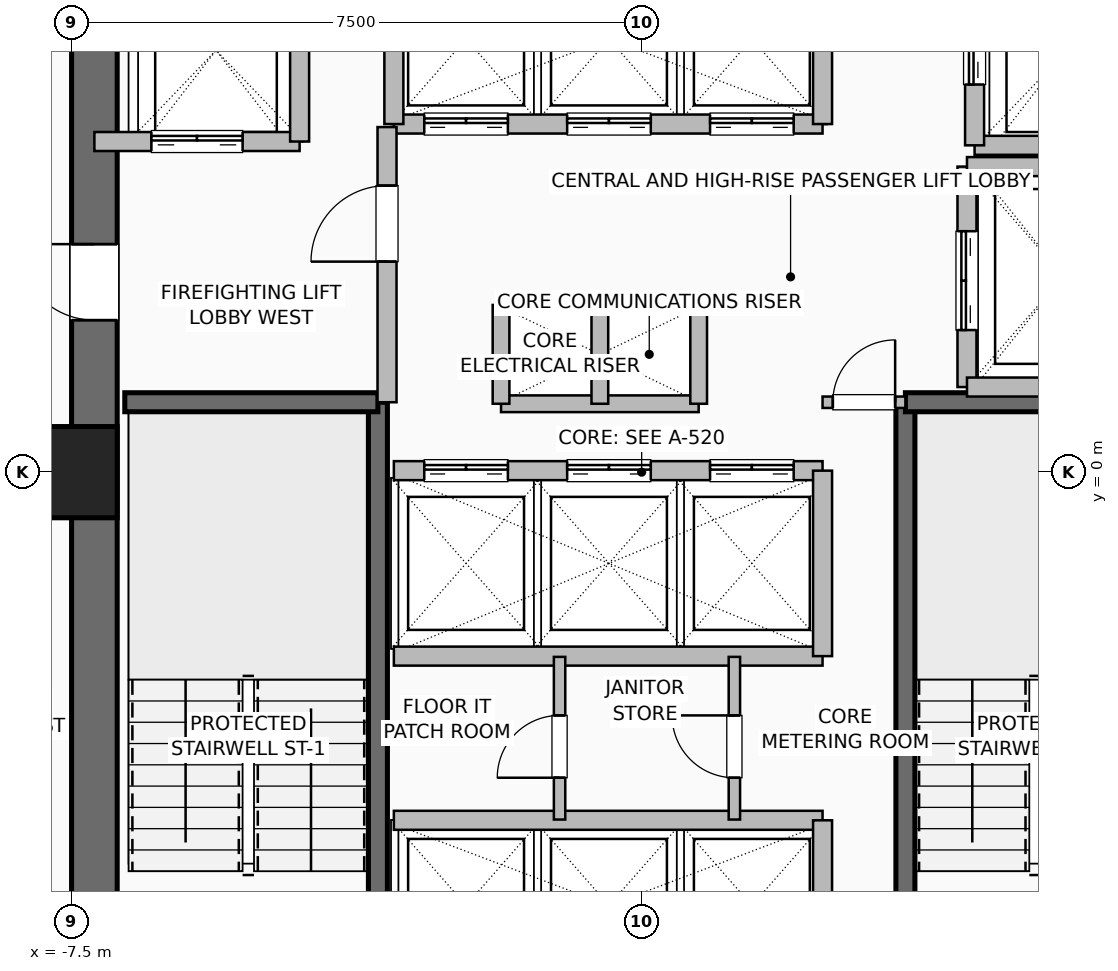
"""IFC4 building model, lengths in metres.
Left out: names, types, materials, properties, quantities, classifications, styles, units other than length and angle.
Written with IfcOpenShell. Run it as: python <this file> out.ifc"""

import sys

from ifc_helpers import new_model, si_unit, direction, frame, frame_2d, origin, origin_2d, place, context, subcontext, project, spatial, rectangle, hollow_rectangle, extrude, element, fill, save


model = new_model("IFC4")
c1 = context("Model", 3, precision=1e-05, world=origin(), true_north=direction((0.0, 1.0)))
c2 = subcontext(c1, "Body", "Model", "MODEL_VIEW")
j1 = project(units=[si_unit("LENGTHUNIT", "METRE"), si_unit("PLANEANGLEUNIT", "RADIAN")], contexts=[c1])
p1 = place(None, origin())
s1 = spatial("IfcSite", under=j1, at=p1, CompositionType="ELEMENT")
p2 = place(p1, origin())
s2 = spatial("IfcBuilding", under=s1, at=p2, CompositionType="ELEMENT")
p3 = place(p2, frame((0.0, 0.0, 76.0)))
s3 = spatial("IfcBuildingStorey", under=s2, at=p3, CompositionType="ELEMENT", Elevation=76.0)
p4 = place(p3, frame((-7.5, 0.0, 0.0), z_axis=(0.0, 0.0, 1.0), x_axis=(1.0, 0.0, 0.0)))
e1 = element("IfcColumn", 1, at=p4, inside=s3, PredefinedType="COLUMN", context=c2, shape_type="SweptSolid", body=[
    extrude(hollow_rectangle(XDim=1.2, YDim=1.2, WallThickness=0.055, at=origin_2d()), origin(), (0.0, 0.0, 1.0), 3.5),
])
p5 = place(p3, frame((-7.2, -7.5, 0.0), z_axis=(0.0, 0.0, 1.0), x_axis=(0.0, 1.0, 0.0)))
e2 = element("IfcWall", 2, at=p5, inside=s3, PredefinedType="SHEAR", context=c2, shape_type="SweptSolid", body=[
    extrude(rectangle(XDim=15.0, YDim=0.6, at=frame_2d((7.5, 0.0))), origin(), (0.0, 0.0, 1.0), 3.25),
])
p6 = place(p5, frame((9.5, 0.0, 0.0)))
e3 = element("IfcOpeningElement", 3, at=p6, cuts=e2, PredefinedType="OPENING", context=c2, shape_type="SweptSolid", body=[
    extrude(rectangle(XDim=1.0, YDim=2.08, at=frame_2d((0.5, 1.04))), frame((0.0, 0.31, 0.0), z_axis=(0.0, -1.0, 0.0), x_axis=(1.0, 0.0, 0.0)), (0.0, 0.0, 1.0), 0.62),
])
p7 = place(p3, frame((-3.47, -6.8, 0.0), z_axis=(0.0, 0.0, 1.0), x_axis=(0.0, 1.0, 0.0)))
e4 = element("IfcWall", 4, at=p7, inside=s3, PredefinedType="SHEAR", context=c2, shape_type="SweptSolid", body=[
    extrude(rectangle(XDim=7.72, YDim=0.25, at=frame_2d((3.86, 0.0))), origin(), (0.0, 0.0, 1.0), 3.25),
])
p8 = place(p3, frame((-6.8, 0.92, 0.0), z_axis=(0.0, 0.0, 1.0), x_axis=(1.0, 0.0, 0.0)))
e5 = element("IfcWall", 5, at=p8, inside=s3, PredefinedType="SHEAR", context=c2, shape_type="SweptSolid", body=[
    extrude(rectangle(XDim=3.33, YDim=0.25, at=frame_2d((1.665, 0.0))), origin(), (0.0, 0.0, 1.0), 3.25),
])
p9 = place(p3, frame((3.47, -6.8, 0.0), z_axis=(0.0, 0.0, 1.0), x_axis=(0.0, 1.0, 0.0)))
e6 = element("IfcWall", 6, at=p9, inside=s3, PredefinedType="SHEAR", context=c2, shape_type="SweptSolid", body=[
    extrude(rectangle(XDim=7.72, YDim=0.25, at=frame_2d((3.86, 0.0))), origin(), (0.0, 0.0, 1.0), 3.25),
])
p10 = place(p3, frame((3.47, 0.92, 0.0), z_axis=(0.0, 0.0, 1.0), x_axis=(1.0, 0.0, 0.0)))
e7 = element("IfcWall", 7, at=p10, inside=s3, PredefinedType="SHEAR", context=c2, shape_type="SweptSolid", body=[
    extrude(rectangle(XDim=3.33, YDim=0.25, at=frame_2d((1.665, 0.0))), origin(), (0.0, 0.0, 1.0), 3.25),
])
for number, where, z_axis, x_axis in (
    (8, (-1.85, 2.2, 0.0), (0.0, 0.0, 1.0), (1.0, 0.0, 0.0)),
    (9, (-1.85, 0.9, 0.0), (0.0, 0.0, 1.0), (1.0, 0.0, 0.0)),
):
    element("IfcWall", number, at=place(p3, frame(where, z_axis=z_axis, x_axis=x_axis)), inside=s3, PredefinedType="PARTITIONING", context=c2, shape_type="SweptSolid", body=[
        extrude(rectangle(XDim=2.6, YDim=0.22, at=frame_2d((1.3, 0.0))), origin(), (0.0, 0.0, 1.0), 3.25),
    ])
for number, where, z_axis, x_axis in (
    (10, (-0.55, 0.9, 0.0), (0.0, 0.0, 1.0), (0.0, 1.0, 0.0)),
    (11, (0.75, 0.9, 0.0), (0.0, 0.0, 1.0), (0.0, 1.0, 0.0)),
    (12, (-1.85, 0.9, 0.0), (0.0, 0.0, 1.0), (0.0, 1.0, 0.0)),
):
    element("IfcWall", number, at=place(p3, frame(where, z_axis=z_axis, x_axis=x_axis)), inside=s3, PredefinedType="PARTITIONING", context=c2, shape_type="SweptSolid", body=[
        extrude(rectangle(XDim=1.3, YDim=0.22, at=frame_2d((0.65, 0.0))), origin(), (0.0, 0.0, 1.0), 3.25),
    ])
p11 = place(p3, frame((-3.26, -4.58, 0.0), z_axis=(0.0, 0.0, 1.0), x_axis=(1.0, 0.0, 0.0)))
e13 = element("IfcWall", 13, at=p11, inside=s3, PredefinedType="SHEAR", context=c2, shape_type="SweptSolid", body=[
    extrude(rectangle(XDim=5.64, YDim=0.25, at=frame_2d((2.82, 0.0))), origin(), (0.0, 0.0, 1.0), 3.25),
])
p12 = place(p3, frame((2.38, -6.8, 0.0), z_axis=(0.0, 0.0, 1.0), x_axis=(0.0, 1.0, 0.0)))
e14 = element("IfcWall", 14, at=p12, inside=s3, PredefinedType="SHEAR", context=c2, shape_type="SweptSolid", body=[
    extrude(rectangle(XDim=2.22, YDim=0.25, at=frame_2d((1.11, 0.0))), origin(), (0.0, 0.0, 1.0), 3.25),
])
p13 = place(p3, frame((-3.26, 0.02, 0.0), z_axis=(0.0, 0.0, 1.0), x_axis=(1.0, 0.0, 0.0)))
e15 = element("IfcWall", 15, at=p13, inside=s3, PredefinedType="SHEAR", context=c2, shape_type="SweptSolid", body=[
    extrude(rectangle(XDim=5.64, YDim=0.25, at=frame_2d((2.82, 0.0))), origin(), (0.0, 0.0, 1.0), 3.25),
])
p14 = place(p13, frame((0.4, 0.0, 0.0)))
e16 = element("IfcOpeningElement", 16, at=p14, cuts=e15, PredefinedType="OPENING", context=c2, shape_type="SweptSolid", body=[
    extrude(rectangle(XDim=1.1, YDim=2.2, at=frame_2d((0.55, 1.1))), frame((0.0, 0.135, 0.0), z_axis=(0.0, -1.0, 0.0), x_axis=(1.0, 0.0, 0.0)), (0.0, 0.0, 1.0), 0.27),
])
p15 = place(p13, frame((2.28, 0.0, 0.0)))
e17 = element("IfcOpeningElement", 17, at=p15, cuts=e15, PredefinedType="OPENING", context=c2, shape_type="SweptSolid", body=[
    extrude(rectangle(XDim=1.1, YDim=2.2, at=frame_2d((0.55, 1.1))), frame((0.0, 0.135, 0.0), z_axis=(0.0, -1.0, 0.0), x_axis=(1.0, 0.0, 0.0)), (0.0, 0.0, 1.0), 0.27),
])
p16 = place(p13, frame((4.16, 0.0, 0.0)))
e18 = element("IfcOpeningElement", 18, at=p16, cuts=e15, PredefinedType="OPENING", context=c2, shape_type="SweptSolid", body=[
    extrude(rectangle(XDim=1.1, YDim=2.2, at=frame_2d((0.55, 1.1))), frame((0.0, 0.135, 0.0), z_axis=(0.0, -1.0, 0.0), x_axis=(1.0, 0.0, 0.0)), (0.0, 0.0, 1.0), 0.27),
])
p17 = place(p3, frame((-3.26, -2.42, 0.0), z_axis=(0.0, 0.0, 1.0), x_axis=(1.0, 0.0, 0.0)))
e19 = element("IfcWall", 19, at=p17, inside=s3, PredefinedType="SHEAR", context=c2, shape_type="SweptSolid", body=[
    extrude(rectangle(XDim=5.64, YDim=0.25, at=frame_2d((2.82, 0.0))), origin(), (0.0, 0.0, 1.0), 3.25),
])
p18 = place(p3, frame((2.38, -2.42, 0.0), z_axis=(0.0, 0.0, 1.0), x_axis=(0.0, 1.0, 0.0)))
e20 = element("IfcWall", 20, at=p18, inside=s3, PredefinedType="SHEAR", context=c2, shape_type="SweptSolid", body=[
    extrude(rectangle(XDim=2.44, YDim=0.25, at=frame_2d((1.22, 0.0))), origin(), (0.0, 0.0, 1.0), 3.25),
])
p19 = place(p3, frame((-3.26, 4.58, 0.0), z_axis=(0.0, 0.0, 1.0), x_axis=(1.0, 0.0, 0.0)))
e21 = element("IfcWall", 21, at=p19, inside=s3, PredefinedType="SHEAR", context=c2, shape_type="SweptSolid", body=[
    extrude(rectangle(XDim=5.64, YDim=0.25, at=frame_2d((2.82, 0.0))), origin(), (0.0, 0.0, 1.0), 3.25),
])
p20 = place(p19, frame((0.4, 0.0, 0.0)))
e22 = element("IfcOpeningElement", 22, at=p20, cuts=e21, PredefinedType="OPENING", context=c2, shape_type="SweptSolid", body=[
    extrude(rectangle(XDim=1.1, YDim=2.2, at=frame_2d((0.55, 1.1))), frame((0.0, 0.135, 0.0), z_axis=(0.0, -1.0, 0.0), x_axis=(1.0, 0.0, 0.0)), (0.0, 0.0, 1.0), 0.27),
])
p21 = place(p19, frame((2.28, 0.0, 0.0)))
e23 = element("IfcOpeningElement", 23, at=p21, cuts=e21, PredefinedType="OPENING", context=c2, shape_type="SweptSolid", body=[
    extrude(rectangle(XDim=1.1, YDim=2.2, at=frame_2d((0.55, 1.1))), frame((0.0, 0.135, 0.0), z_axis=(0.0, -1.0, 0.0), x_axis=(1.0, 0.0, 0.0)), (0.0, 0.0, 1.0), 0.27),
])
p22 = place(p19, frame((4.16, 0.0, 0.0)))
e24 = element("IfcOpeningElement", 24, at=p22, cuts=e21, PredefinedType="OPENING", context=c2, shape_type="SweptSolid", body=[
    extrude(rectangle(XDim=1.1, YDim=2.2, at=frame_2d((0.55, 1.1))), frame((0.0, 0.135, 0.0), z_axis=(0.0, -1.0, 0.0), x_axis=(1.0, 0.0, 0.0)), (0.0, 0.0, 1.0), 0.27),
])
for number, where, z_axis, x_axis in (
    (25, (-3.26, 4.58, 0.0), (0.0, 0.0, 1.0), (0.0, 1.0, 0.0)),
    (26, (2.38, 4.58, 0.0), (0.0, 0.0, 1.0), (0.0, 1.0, 0.0)),
):
    element("IfcWall", number, at=place(p3, frame(where, z_axis=z_axis, x_axis=x_axis)), inside=s3, PredefinedType="SHEAR", context=c2, shape_type="SweptSolid", body=[
        extrude(rectangle(XDim=2.22, YDim=0.25, at=frame_2d((1.11, 0.0))), origin(), (0.0, 0.0, 1.0), 3.25),
    ])
p23 = place(p3, frame((-7.2, 4.35, 0.0), z_axis=(0.0, 0.0, 1.0), x_axis=(1.0, 0.0, 0.0)))
e27 = element("IfcWall", 27, at=p23, inside=s3, PredefinedType="SHEAR", context=c2, shape_type="SweptSolid", body=[
    extrude(rectangle(XDim=2.7, YDim=0.25, at=frame_2d((1.35, 0.0))), origin(), (0.0, 0.0, 1.0), 3.25),
])
p24 = place(p23, frame((0.75, 0.0, 0.0)))
e28 = element("IfcOpeningElement", 28, at=p24, cuts=e27, PredefinedType="OPENING", context=c2, shape_type="SweptSolid", body=[
    extrude(rectangle(XDim=1.2, YDim=2.2, at=frame_2d((0.6, 1.1))), frame((0.0, 0.135, 0.0), z_axis=(0.0, -1.0, 0.0), x_axis=(1.0, 0.0, 0.0)), (0.0, 0.0, 1.0), 0.27),
])
p25 = place(p3, frame((-4.5, 4.35, 0.0), z_axis=(0.0, 0.0, 1.0), x_axis=(0.0, 1.0, 0.0)))
e29 = element("IfcWall", 29, at=p25, inside=s3, PredefinedType="SHEAR", context=c2, shape_type="SweptSolid", body=[
    extrude(rectangle(XDim=2.85, YDim=0.25, at=frame_2d((1.425, 0.0))), origin(), (0.0, 0.0, 1.0), 3.25),
])
p26 = place(p3, frame((4.38, 4.3, 0.0), z_axis=(0.0, 0.0, 1.0), x_axis=(1.0, 0.0, 0.0)))
e30 = element("IfcWall", 30, at=p26, inside=s3, PredefinedType="SHEAR", context=c2, shape_type="SweptSolid", body=[
    extrude(rectangle(XDim=2.42, YDim=0.25, at=frame_2d((1.21, 0.0))), origin(), (0.0, 0.0, 1.0), 3.25),
])
p27 = place(p3, frame((4.38, 4.3, 0.0), z_axis=(0.0, 0.0, 1.0), x_axis=(0.0, 1.0, 0.0)))
e31 = element("IfcWall", 31, at=p27, inside=s3, PredefinedType="SHEAR", context=c2, shape_type="SweptSolid", body=[
    extrude(rectangle(XDim=2.5, YDim=0.25, at=frame_2d((1.25, 0.0))), origin(), (0.0, 0.0, 1.0), 3.25),
])
p28 = place(p27, frame((0.8, 0.0, 0.0)))
e32 = element("IfcOpeningElement", 32, at=p28, cuts=e31, PredefinedType="OPENING", context=c2, shape_type="SweptSolid", body=[
    extrude(rectangle(XDim=1.2, YDim=2.2, at=frame_2d((0.6, 1.1))), frame((0.0, 0.135, 0.0), z_axis=(0.0, -1.0, 0.0), x_axis=(1.0, 0.0, 0.0)), (0.0, 0.0, 1.0), 0.27),
])
p29 = place(p3, frame((4.28, 1.12, 0.0), z_axis=(0.0, 0.0, 1.0), x_axis=(0.0, 1.0, 0.0)))
e33 = element("IfcWall", 33, at=p29, inside=s3, PredefinedType="SHEAR", context=c2, shape_type="SweptSolid", body=[
    extrude(rectangle(XDim=2.9, YDim=0.25, at=frame_2d((1.45, 0.0))), origin(), (0.0, 0.0, 1.0), 3.25),
])
p30 = place(p29, frame((0.75, 0.0, 0.0)))
e34 = element("IfcOpeningElement", 34, at=p30, cuts=e33, PredefinedType="OPENING", context=c2, shape_type="SweptSolid", body=[
    extrude(rectangle(XDim=1.3, YDim=2.3, at=frame_2d((0.65, 1.15))), frame((0.0, 0.135, 0.0), z_axis=(0.0, -1.0, 0.0), x_axis=(1.0, 0.0, 0.0)), (0.0, 0.0, 1.0), 0.27),
])
for number, where, z_axis, x_axis in (
    (35, (4.28, 1.12, 0.0), (0.0, 0.0, 1.0), (1.0, 0.0, 0.0)),
    (36, (4.28, 4.02, 0.0), (0.0, 0.0, 1.0), (1.0, 0.0, 0.0)),
):
    element("IfcWall", number, at=place(p3, frame(where, z_axis=z_axis, x_axis=x_axis)), inside=s3, PredefinedType="SHEAR", context=c2, shape_type="SweptSolid", body=[
        extrude(rectangle(XDim=2.52, YDim=0.25, at=frame_2d((1.26, 0.0))), origin(), (0.0, 0.0, 1.0), 3.25),
    ])
p31 = place(p3, frame((-3.35, 0.92, 0.0), z_axis=(0.0, 0.0, 1.0), x_axis=(0.0, 1.0, 0.0)))
e37 = element("IfcWall", 37, at=p31, inside=s3, PredefinedType="SHEAR", context=c2, shape_type="SweptSolid", body=[
    extrude(rectangle(XDim=3.62, YDim=0.25, at=frame_2d((1.81, 0.0))), origin(), (0.0, 0.0, 1.0), 3.25),
])
p32 = place(p31, frame((1.85, 0.0, 0.0)))
e38 = element("IfcOpeningElement", 38, at=p32, cuts=e37, PredefinedType="OPENING", context=c2, shape_type="SweptSolid", body=[
    extrude(rectangle(XDim=1.0, YDim=2.08, at=frame_2d((0.5, 1.04))), frame((0.0, 0.135, 0.0), z_axis=(0.0, -1.0, 0.0), x_axis=(1.0, 0.0, 0.0)), (0.0, 0.0, 1.0), 0.27),
])
p33 = place(p3, frame((2.38, 0.92, 0.0), z_axis=(0.0, 0.0, 1.0), x_axis=(1.0, 0.0, 0.0)))
e39 = element("IfcWall", 39, at=p33, inside=s3, PredefinedType="PARTITIONING", context=c2, shape_type="SweptSolid", body=[
    extrude(rectangle(XDim=1.09, YDim=0.15, at=frame_2d((0.545, 0.0))), origin(), (0.0, 0.0, 1.0), 3.25),
])
p34 = place(p33, frame((0.135, 0.0, 0.0)))
e40 = element("IfcOpeningElement", 40, at=p34, cuts=e39, PredefinedType="OPENING", context=c2, shape_type="SweptSolid", body=[
    extrude(rectangle(XDim=0.82, YDim=2.05, at=frame_2d((0.41, 1.025))), frame((0.0, 0.085, 0.0), z_axis=(0.0, -1.0, 0.0), x_axis=(1.0, 0.0, 0.0)), (0.0, 0.0, 1.0), 0.17),
])
p35 = place(p3, frame((-1.08, -4.57, 0.0), z_axis=(0.0, 0.0, 1.0), x_axis=(0.0, 1.0, 0.0)))
e41 = element("IfcWall", 41, at=p35, inside=s3, PredefinedType="PARTITIONING", context=c2, shape_type="SweptSolid", body=[
    extrude(rectangle(XDim=2.14, YDim=0.15, at=frame_2d((1.07, 0.0))), origin(), (0.0, 0.0, 1.0), 3.25),
])
p36 = place(p35, frame((0.55, 0.0, 0.0)))
e42 = element("IfcOpeningElement", 42, at=p36, cuts=e41, PredefinedType="OPENING", context=c2, shape_type="SweptSolid", body=[
    extrude(rectangle(XDim=0.82, YDim=2.05, at=frame_2d((0.41, 1.025))), frame((0.0, 0.085, 0.0), z_axis=(0.0, -1.0, 0.0), x_axis=(1.0, 0.0, 0.0)), (0.0, 0.0, 1.0), 0.17),
])
p37 = place(p3, frame((1.22, -4.57, 0.0), z_axis=(0.0, 0.0, 1.0), x_axis=(0.0, 1.0, 0.0)))
e43 = element("IfcWall", 43, at=p37, inside=s3, PredefinedType="PARTITIONING", context=c2, shape_type="SweptSolid", body=[
    extrude(rectangle(XDim=2.14, YDim=0.15, at=frame_2d((1.07, 0.0))), origin(), (0.0, 0.0, 1.0), 3.25),
])
p38 = place(p37, frame((0.55, 0.0, 0.0)))
e44 = element("IfcOpeningElement", 44, at=p38, cuts=e43, PredefinedType="OPENING", context=c2, shape_type="SweptSolid", body=[
    extrude(rectangle(XDim=0.82, YDim=2.05, at=frame_2d((0.41, 1.025))), frame((0.0, 0.085, 0.0), z_axis=(0.0, -1.0, 0.0), x_axis=(1.0, 0.0, 0.0)), (0.0, 0.0, 1.0), 0.17),
])
p39 = place(p6, origin())
e45 = element("IfcDoor", 45, at=p39, inside=s3, OperationType="SINGLE_SWING_RIGHT", PredefinedType="DOOR", context=c2, shape_type="SweptSolid", body=[
    extrude(rectangle(XDim=1.0, YDim=2.08, at=frame_2d((0.5, 1.04))), frame((0.0, 0.025, 0.0), z_axis=(0.0, -1.0, 0.0), x_axis=(1.0, 0.0, 0.0)), (0.0, 0.0, 1.0), 0.05),
])
fill(e3, e45)
p40 = place(p14, origin())
e46 = element("IfcDoor", 46, at=p40, inside=s3, OperationType="DOUBLE_DOOR_SLIDING", PredefinedType="DOOR", context=c2, shape_type="SweptSolid", body=[
    extrude(rectangle(XDim=1.1, YDim=2.2, at=frame_2d((0.55, 1.1))), frame((0.0, 0.025, 0.0), z_axis=(0.0, -1.0, 0.0), x_axis=(1.0, 0.0, 0.0)), (0.0, 0.0, 1.0), 0.05),
])
fill(e16, e46)
p41 = place(p15, origin())
e47 = element("IfcDoor", 47, at=p41, inside=s3, OperationType="DOUBLE_DOOR_SLIDING", PredefinedType="DOOR", context=c2, shape_type="SweptSolid", body=[
    extrude(rectangle(XDim=1.1, YDim=2.2, at=frame_2d((0.55, 1.1))), frame((0.0, 0.025, 0.0), z_axis=(0.0, -1.0, 0.0), x_axis=(1.0, 0.0, 0.0)), (0.0, 0.0, 1.0), 0.05),
])
fill(e17, e47)
p42 = place(p16, origin())
e48 = element("IfcDoor", 48, at=p42, inside=s3, OperationType="DOUBLE_DOOR_SLIDING", PredefinedType="DOOR", context=c2, shape_type="SweptSolid", body=[
    extrude(rectangle(XDim=1.1, YDim=2.2, at=frame_2d((0.55, 1.1))), frame((0.0, 0.025, 0.0), z_axis=(0.0, -1.0, 0.0), x_axis=(1.0, 0.0, 0.0)), (0.0, 0.0, 1.0), 0.05),
])
fill(e18, e48)
p43 = place(p20, origin())
e49 = element("IfcDoor", 49, at=p43, inside=s3, OperationType="DOUBLE_DOOR_SLIDING", PredefinedType="DOOR", context=c2, shape_type="SweptSolid", body=[
    extrude(rectangle(XDim=1.1, YDim=2.2, at=frame_2d((0.55, 1.1))), frame((0.0, 0.025, 0.0), z_axis=(0.0, -1.0, 0.0), x_axis=(1.0, 0.0, 0.0)), (0.0, 0.0, 1.0), 0.05),
])
fill(e22, e49)
p44 = place(p21, origin())
e50 = element("IfcDoor", 50, at=p44, inside=s3, OperationType="DOUBLE_DOOR_SLIDING", PredefinedType="DOOR", context=c2, shape_type="SweptSolid", body=[
    extrude(rectangle(XDim=1.1, YDim=2.2, at=frame_2d((0.55, 1.1))), frame((0.0, 0.025, 0.0), z_axis=(0.0, -1.0, 0.0), x_axis=(1.0, 0.0, 0.0)), (0.0, 0.0, 1.0), 0.05),
])
fill(e23, e50)
p45 = place(p22, origin())
e51 = element("IfcDoor", 51, at=p45, inside=s3, OperationType="DOUBLE_DOOR_SLIDING", PredefinedType="DOOR", context=c2, shape_type="SweptSolid", body=[
    extrude(rectangle(XDim=1.1, YDim=2.2, at=frame_2d((0.55, 1.1))), frame((0.0, 0.025, 0.0), z_axis=(0.0, -1.0, 0.0), x_axis=(1.0, 0.0, 0.0)), (0.0, 0.0, 1.0), 0.05),
])
fill(e24, e51)
p46 = place(p24, origin())
e52 = element("IfcDoor", 52, at=p46, inside=s3, OperationType="DOUBLE_DOOR_SLIDING", PredefinedType="DOOR", context=c2, shape_type="SweptSolid", body=[
    extrude(rectangle(XDim=1.2, YDim=2.2, at=frame_2d((0.6, 1.1))), frame((0.0, 0.025, 0.0), z_axis=(0.0, -1.0, 0.0), x_axis=(1.0, 0.0, 0.0)), (0.0, 0.0, 1.0), 0.05),
])
fill(e28, e52)
p47 = place(p28, origin())
e53 = element("IfcDoor", 53, at=p47, inside=s3, OperationType="DOUBLE_DOOR_SLIDING", PredefinedType="DOOR", context=c2, shape_type="SweptSolid", body=[
    extrude(rectangle(XDim=1.2, YDim=2.2, at=frame_2d((0.6, 1.1))), frame((0.0, 0.025, 0.0), z_axis=(0.0, -1.0, 0.0), x_axis=(1.0, 0.0, 0.0)), (0.0, 0.0, 1.0), 0.05),
])
fill(e32, e53)
p48 = place(p30, origin())
e54 = element("IfcDoor", 54, at=p48, inside=s3, OperationType="DOUBLE_DOOR_SLIDING", PredefinedType="DOOR", context=c2, shape_type="SweptSolid", body=[
    extrude(rectangle(XDim=1.3, YDim=2.3, at=frame_2d((0.65, 1.15))), frame((0.0, 0.025, 0.0), z_axis=(0.0, -1.0, 0.0), x_axis=(1.0, 0.0, 0.0)), (0.0, 0.0, 1.0), 0.05),
])
fill(e34, e54)
p49 = place(p32, origin())
e55 = element("IfcDoor", 55, at=p49, inside=s3, OperationType="SINGLE_SWING_LEFT", PredefinedType="DOOR", context=c2, shape_type="SweptSolid", body=[
    extrude(rectangle(XDim=1.0, YDim=2.08, at=frame_2d((0.5, 1.04))), frame((0.0, 0.025, 0.0), z_axis=(0.0, -1.0, 0.0), x_axis=(1.0, 0.0, 0.0)), (0.0, 0.0, 1.0), 0.05),
])
fill(e38, e55)
p50 = place(p34, origin())
e56 = element("IfcDoor", 56, at=p50, inside=s3, OperationType="SINGLE_SWING_RIGHT", PredefinedType="DOOR", context=c2, shape_type="SweptSolid", body=[
    extrude(rectangle(XDim=0.82, YDim=2.05, at=frame_2d((0.41, 1.025))), frame((0.0, 0.025, 0.0), z_axis=(0.0, -1.0, 0.0), x_axis=(1.0, 0.0, 0.0)), (0.0, 0.0, 1.0), 0.05),
])
fill(e40, e56)
p51 = place(p36, origin())
e57 = element("IfcDoor", 57, at=p51, inside=s3, OperationType="SINGLE_SWING_LEFT", PredefinedType="DOOR", context=c2, shape_type="SweptSolid", body=[
    extrude(rectangle(XDim=0.82, YDim=2.05, at=frame_2d((0.41, 1.025))), frame((0.0, 0.025, 0.0), z_axis=(0.0, -1.0, 0.0), x_axis=(1.0, 0.0, 0.0)), (0.0, 0.0, 1.0), 0.05),
])
fill(e42, e57)
p52 = place(p38, origin())
e58 = element("IfcDoor", 58, at=p52, inside=s3, OperationType="SINGLE_SWING_RIGHT", PredefinedType="DOOR", context=c2, shape_type="SweptSolid", body=[
    extrude(rectangle(XDim=0.82, YDim=2.05, at=frame_2d((0.41, 1.025))), frame((0.0, 0.025, 0.0), z_axis=(0.0, -1.0, 0.0), x_axis=(1.0, 0.0, 0.0)), (0.0, 0.0, 1.0), 0.05),
])
fill(e44, e58)
save(model, sys.argv[1])
